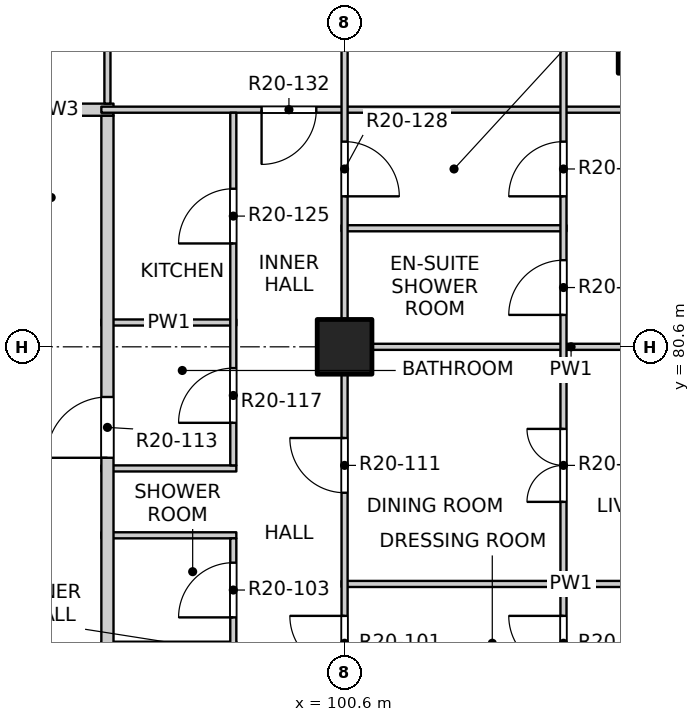
"""IFC4 building model, lengths in metres.
Left out: names, types, materials, properties, quantities, classifications, styles, units other than length and angle.
Written with IfcOpenShell. Run it as: python <this file> out.ifc"""

import sys

from ifc_helpers import new_model, si_unit, direction, frame, frame_2d, origin, origin_2d, place, context, subcontext, project, spatial, rectangle, extrude, element, fill, save


model = new_model("IFC4")
c1 = context("Model", 3, precision=1e-05, world=origin(), true_north=direction((0.0, 1.0)))
c2 = subcontext(c1, "Body", "Model", "MODEL_VIEW")
j1 = project(units=[si_unit("LENGTHUNIT", "METRE"), si_unit("PLANEANGLEUNIT", "RADIAN")], contexts=[c1])
p1 = place(None, origin())
s1 = spatial("IfcSite", under=j1, at=p1, CompositionType="ELEMENT")
p2 = place(p1, origin())
s2 = spatial("IfcBuilding", under=s1, at=p2, CompositionType="ELEMENT")
p3 = place(p2, frame((0.0, 0.0, 210.9)))
s3 = spatial("IfcBuildingStorey", under=s2, at=p3, CompositionType="ELEMENT", Elevation=210.9)
p4 = place(p3, frame((105.5, 85.5, -0.25), z_axis=(0.0, 0.0, 1.0), x_axis=(1.0, 0.0, 0.0)))
e1 = element("IfcColumn", 1, at=p4, inside=s3, PredefinedType="COLUMN", context=c2, shape_type="SweptSolid", body=[
    extrude(rectangle(XDim=0.8, YDim=0.8, at=origin_2d()), origin(), (0.0, 0.0, 1.0), 3.4),
])
p5 = place(p3, frame((100.6, 80.6, -0.25), z_axis=(0.0, 0.0, 1.0), x_axis=(1.0, 0.0, 0.0)))
e2 = element("IfcColumn", 2, at=p5, inside=s3, PredefinedType="COLUMN", context=c2, shape_type="SweptSolid", body=[
    extrude(rectangle(XDim=0.9, YDim=0.9, at=origin_2d()), origin(), (0.0, 0.0, 1.0), 3.4),
])
p6 = place(p3, frame((100.55, 76.7, 0.0), z_axis=(0.0, 0.0, 1.0), x_axis=(1.0, 0.0, 0.0)))
e3 = element("IfcWall", 3, at=p6, inside=s3, PredefinedType="PARTITIONING", context=c2, shape_type="SweptSolid", body=[
    extrude(rectangle(XDim=7.55, YDim=0.1, at=frame_2d((3.775, 0.0))), origin(), (0.0, 0.0, 1.0), 2.55),
])
for number, where, z_axis, x_axis in (
    (4, (96.6, 77.5, 0.0), (0.0, 0.0, 1.0), (1.0, 0.0, 0.0)),
    (5, (96.6, 78.6, 0.0), (0.0, 0.0, 1.0), (1.0, 0.0, 0.0)),
):
    element("IfcWall", number, at=place(p3, frame(where, z_axis=z_axis, x_axis=x_axis)), inside=s3, PredefinedType="PARTITIONING", context=c2, shape_type="SweptSolid", body=[
        extrude(rectangle(XDim=2.22, YDim=0.1, at=frame_2d((1.11, 0.0))), origin(), (0.0, 0.0, 1.0), 3.15),
    ])
p7 = place(p3, frame((100.55, 80.6, 0.0), z_axis=(0.0, 0.0, 1.0), x_axis=(1.0, 0.0, 0.0)))
e6 = element("IfcWall", 6, at=p7, inside=s3, PredefinedType="PARTITIONING", context=c2, shape_type="SweptSolid", body=[
    extrude(rectangle(XDim=7.55, YDim=0.1, at=frame_2d((3.775, 0.0))), origin(), (0.0, 0.0, 1.0), 3.15),
])
p8 = place(p3, frame((96.6, 81.0, 0.0), z_axis=(0.0, 0.0, 1.0), x_axis=(1.0, 0.0, 0.0)))
e7 = element("IfcWall", 7, at=p8, inside=s3, PredefinedType="PARTITIONING", context=c2, shape_type="SweptSolid", body=[
    extrude(rectangle(XDim=2.22, YDim=0.1, at=frame_2d((1.11, 0.0))), origin(), (0.0, 0.0, 1.0), 3.15),
])
p9 = place(p3, frame((100.55, 82.55, 0.0), z_axis=(0.0, 0.0, 1.0), x_axis=(1.0, 0.0, 0.0)))
e8 = element("IfcWall", 8, at=p9, inside=s3, PredefinedType="PARTITIONING", context=c2, shape_type="SweptSolid", body=[
    extrude(rectangle(XDim=3.7, YDim=0.1, at=frame_2d((1.85, 0.0))), origin(), (0.0, 0.0, 1.0), 3.15),
])
p10 = place(p3, frame((94.95, 84.5, 0.0), z_axis=(0.0, 0.0, 1.0), x_axis=(1.0, 0.0, 0.0)))
e9 = element("IfcWall", 9, at=p10, inside=s3, PredefinedType="PARTITIONING", context=c2, shape_type="SweptSolid", body=[
    extrude(rectangle(XDim=1.85, YDim=0.2, at=frame_2d((0.925, 0.0))), origin(), (0.0, 0.0, 1.0), 3.15),
])
p11 = place(p3, frame((96.6, 84.5, 0.0), z_axis=(0.0, 0.0, 1.0), x_axis=(1.0, 0.0, 0.0)))
e10 = element("IfcWall", 10, at=p11, inside=s3, PredefinedType="PARTITIONING", context=c2, shape_type="SweptSolid", body=[
    extrude(rectangle(XDim=11.5, YDim=0.1, at=frame_2d((5.75, 0.0))), origin(), (0.0, 0.0, 1.0), 3.15),
])
p12 = place(p11, frame((2.635, 0.0, 0.0)))
e11 = element("IfcOpeningElement", 11, at=p12, cuts=e10, PredefinedType="OPENING", context=c2, shape_type="SweptSolid", body=[
    extrude(rectangle(XDim=0.9, YDim=2.1, at=frame_2d((0.45, 1.05))), frame((0.0, 0.06, 0.0), z_axis=(0.0, -1.0, 0.0), x_axis=(1.0, 0.0, 0.0)), (0.0, 0.0, 1.0), 0.12),
])
p13 = place(p3, frame((96.7, 49.5, 0.0), z_axis=(0.0, 0.0, 1.0), x_axis=(0.0, 1.0, 0.0)))
e12 = element("IfcWall", 12, at=p13, inside=s3, PredefinedType="PARTITIONING", context=c2, shape_type="SweptSolid", body=[
    extrude(rectangle(XDim=34.9, YDim=0.2, at=frame_2d((17.45, 0.0))), origin(), (0.0, 0.0, 1.0), 3.15),
])
p14 = place(p13, frame((9.625, 0.0, 0.0)))
e13 = element("IfcOpeningElement", 13, at=p14, cuts=e12, PredefinedType="OPENING", context=c2, shape_type="SweptSolid", body=[
    extrude(rectangle(XDim=1.0, YDim=2.1, at=frame_2d((0.5, 1.05))), frame((0.0, 0.11, 0.0), z_axis=(0.0, -1.0, 0.0), x_axis=(1.0, 0.0, 0.0)), (0.0, 0.0, 1.0), 0.22),
])
p15 = place(p13, frame((14.125, 0.0, 0.0)))
e14 = element("IfcOpeningElement", 14, at=p15, cuts=e12, PredefinedType="OPENING", context=c2, shape_type="SweptSolid", body=[
    extrude(rectangle(XDim=1.0, YDim=2.1, at=frame_2d((0.5, 1.05))), frame((0.0, 0.11, 0.0), z_axis=(0.0, -1.0, 0.0), x_axis=(1.0, 0.0, 0.0)), (0.0, 0.0, 1.0), 0.22),
])
p16 = place(p13, frame((29.275, 0.0, 0.0)))
e15 = element("IfcOpeningElement", 15, at=p16, cuts=e12, PredefinedType="OPENING", context=c2, shape_type="SweptSolid", body=[
    extrude(rectangle(XDim=1.0, YDim=2.1, at=frame_2d((0.5, 1.05))), frame((0.0, 0.11, 0.0), z_axis=(0.0, -1.0, 0.0), x_axis=(1.0, 0.0, 0.0)), (0.0, 0.0, 1.0), 0.22),
])
p17 = place(p3, frame((96.7, 84.6, 0.0), z_axis=(0.0, 0.0, 1.0), x_axis=(0.0, 1.0, 0.0)))
e16 = element("IfcWall", 16, at=p17, inside=s3, PredefinedType="PARTITIONING", context=c2, shape_type="SweptSolid", body=[
    extrude(rectangle(XDim=3.5, YDim=0.1, at=frame_2d((1.75, 0.0))), origin(), (0.0, 0.0, 1.0), 3.15),
])
p18 = place(p17, frame((1.4, 0.0, 0.0)))
e17 = element("IfcOpeningElement", 17, at=p18, cuts=e16, PredefinedType="OPENING", context=c2, shape_type="SweptSolid", body=[
    extrude(rectangle(XDim=0.9, YDim=2.1, at=frame_2d((0.45, 1.05))), frame((0.0, 0.06, 0.0), z_axis=(0.0, -1.0, 0.0), x_axis=(1.0, 0.0, 0.0)), (0.0, 0.0, 1.0), 0.12),
])
p19 = place(p3, frame((98.77, 63.5, 0.0), z_axis=(0.0, 0.0, 1.0), x_axis=(0.0, 1.0, 0.0)))
e18 = element("IfcWall", 18, at=p19, inside=s3, PredefinedType="PARTITIONING", context=c2, shape_type="SweptSolid", body=[
    extrude(rectangle(XDim=13.95, YDim=0.1, at=frame_2d((6.975, 0.0))), origin(), (0.0, 0.0, 1.0), 3.15),
])
p20 = place(p19, frame((1.26, 0.0, 0.0)))
e19 = element("IfcOpeningElement", 19, at=p20, cuts=e18, PredefinedType="OPENING", context=c2, shape_type="SweptSolid", body=[
    extrude(rectangle(XDim=0.9, YDim=2.1, at=frame_2d((0.45, 1.05))), frame((0.0, 0.06, 0.0), z_axis=(0.0, -1.0, 0.0), x_axis=(1.0, 0.0, 0.0)), (0.0, 0.0, 1.0), 0.12),
])
p21 = place(p19, frame((4.535, 0.0, 0.0)))
e20 = element("IfcOpeningElement", 20, at=p21, cuts=e18, PredefinedType="OPENING", context=c2, shape_type="SweptSolid", body=[
    extrude(rectangle(XDim=0.8, YDim=2.1, at=frame_2d((0.4, 1.05))), frame((0.0, 0.06, 0.0), z_axis=(0.0, -1.0, 0.0), x_axis=(1.0, 0.0, 0.0)), (0.0, 0.0, 1.0), 0.12),
])
p22 = place(p19, frame((7.45, 0.0, 0.0)))
e21 = element("IfcOpeningElement", 21, at=p22, cuts=e18, PredefinedType="OPENING", context=c2, shape_type="SweptSolid", body=[
    extrude(rectangle(XDim=0.8, YDim=2.1, at=frame_2d((0.4, 1.05))), frame((0.0, 0.06, 0.0), z_axis=(0.0, -1.0, 0.0), x_axis=(1.0, 0.0, 0.0)), (0.0, 0.0, 1.0), 0.12),
])
p23 = place(p19, frame((10.35, 0.0, 0.0)))
e22 = element("IfcOpeningElement", 22, at=p23, cuts=e18, PredefinedType="OPENING", context=c2, shape_type="SweptSolid", body=[
    extrude(rectangle(XDim=0.8, YDim=2.1, at=frame_2d((0.4, 1.05))), frame((0.0, 0.06, 0.0), z_axis=(0.0, -1.0, 0.0), x_axis=(1.0, 0.0, 0.0)), (0.0, 0.0, 1.0), 0.12),
])
p24 = place(p19, frame((12.65, 0.0, 0.0)))
e23 = element("IfcOpeningElement", 23, at=p24, cuts=e18, PredefinedType="OPENING", context=c2, shape_type="SweptSolid", body=[
    extrude(rectangle(XDim=0.9, YDim=2.1, at=frame_2d((0.45, 1.05))), frame((0.0, 0.06, 0.0), z_axis=(0.0, -1.0, 0.0), x_axis=(1.0, 0.0, 0.0)), (0.0, 0.0, 1.0), 0.12),
])
p25 = place(p3, frame((98.77, 78.65, 0.0), z_axis=(0.0, 0.0, 1.0), x_axis=(0.0, 1.0, 0.0)))
e24 = element("IfcWall", 24, at=p25, inside=s3, PredefinedType="PARTITIONING", context=c2, shape_type="SweptSolid", body=[
    extrude(rectangle(XDim=5.8, YDim=0.1, at=frame_2d((2.9, 0.0))), origin(), (0.0, 0.0, 1.0), 3.15),
])
p26 = place(p25, frame((0.7, 0.0, 0.0)))
e25 = element("IfcOpeningElement", 25, at=p26, cuts=e24, PredefinedType="OPENING", context=c2, shape_type="SweptSolid", body=[
    extrude(rectangle(XDim=0.9, YDim=2.1, at=frame_2d((0.45, 1.05))), frame((0.0, 0.06, 0.0), z_axis=(0.0, -1.0, 0.0), x_axis=(1.0, 0.0, 0.0)), (0.0, 0.0, 1.0), 0.12),
])
p27 = place(p25, frame((3.65, 0.0, 0.0)))
e26 = element("IfcOpeningElement", 26, at=p27, cuts=e24, PredefinedType="OPENING", context=c2, shape_type="SweptSolid", body=[
    extrude(rectangle(XDim=0.9, YDim=2.1, at=frame_2d((0.45, 1.05))), frame((0.0, 0.06, 0.0), z_axis=(0.0, -1.0, 0.0), x_axis=(1.0, 0.0, 0.0)), (0.0, 0.0, 1.0), 0.12),
])
p28 = place(p3, frame((100.6, 41.9, 0.0), z_axis=(0.0, 0.0, 1.0), x_axis=(0.0, 1.0, 0.0)))
e27 = element("IfcWall", 27, at=p28, inside=s3, PredefinedType="PARTITIONING", context=c2, shape_type="SweptSolid", body=[
    extrude(rectangle(XDim=46.2, YDim=0.1, at=frame_2d((23.1, 0.0))), origin(), (0.0, 0.0, 1.0), 3.15),
])
p29 = place(p28, frame((1.2, 0.0, 0.0)))
e28 = element("IfcOpeningElement", 28, at=p29, cuts=e27, PredefinedType="OPENING", context=c2, shape_type="SweptSolid", body=[
    extrude(rectangle(XDim=0.9, YDim=2.1, at=frame_2d((0.45, 1.05))), frame((0.0, 0.06, 0.0), z_axis=(0.0, -1.0, 0.0), x_axis=(1.0, 0.0, 0.0)), (0.0, 0.0, 1.0), 0.12),
])
p30 = place(p28, frame((6.025, 0.0, 0.0)))
e29 = element("IfcOpeningElement", 29, at=p30, cuts=e27, PredefinedType="OPENING", context=c2, shape_type="SweptSolid", body=[
    extrude(rectangle(XDim=0.9, YDim=2.1, at=frame_2d((0.45, 1.05))), frame((0.0, 0.06, 0.0), z_axis=(0.0, -1.0, 0.0), x_axis=(1.0, 0.0, 0.0)), (0.0, 0.0, 1.0), 0.12),
])
p31 = place(p28, frame((9.0, 0.0, 0.0)))
e30 = element("IfcOpeningElement", 30, at=p31, cuts=e27, PredefinedType="OPENING", context=c2, shape_type="SweptSolid", body=[
    extrude(rectangle(XDim=0.9, YDim=2.1, at=frame_2d((0.45, 1.05))), frame((0.0, 0.06, 0.0), z_axis=(0.0, -1.0, 0.0), x_axis=(1.0, 0.0, 0.0)), (0.0, 0.0, 1.0), 0.12),
])
p32 = place(p28, frame((13.85, 0.0, 0.0)))
e31 = element("IfcOpeningElement", 31, at=p32, cuts=e27, PredefinedType="OPENING", context=c2, shape_type="SweptSolid", body=[
    extrude(rectangle(XDim=0.9, YDim=2.1, at=frame_2d((0.45, 1.05))), frame((0.0, 0.06, 0.0), z_axis=(0.0, -1.0, 0.0), x_axis=(1.0, 0.0, 0.0)), (0.0, 0.0, 1.0), 0.12),
])
p33 = place(p28, frame((17.775, 0.0, 0.0)))
e32 = element("IfcOpeningElement", 32, at=p33, cuts=e27, PredefinedType="OPENING", context=c2, shape_type="SweptSolid", body=[
    extrude(rectangle(XDim=0.9, YDim=2.1, at=frame_2d((0.45, 1.05))), frame((0.0, 0.06, 0.0), z_axis=(0.0, -1.0, 0.0), x_axis=(1.0, 0.0, 0.0)), (0.0, 0.0, 1.0), 0.12),
])
p34 = place(p28, frame((20.7, 0.0, 0.0)))
e33 = element("IfcOpeningElement", 33, at=p34, cuts=e27, PredefinedType="OPENING", context=c2, shape_type="SweptSolid", body=[
    extrude(rectangle(XDim=0.9, YDim=2.1, at=frame_2d((0.45, 1.05))), frame((0.0, 0.06, 0.0), z_axis=(0.0, -1.0, 0.0), x_axis=(1.0, 0.0, 0.0)), (0.0, 0.0, 1.0), 0.12),
])
p35 = place(p28, frame((24.6, 0.0, 0.0)))
e34 = element("IfcOpeningElement", 34, at=p35, cuts=e27, PredefinedType="OPENING", context=c2, shape_type="SweptSolid", body=[
    extrude(rectangle(XDim=0.9, YDim=2.1, at=frame_2d((0.45, 1.05))), frame((0.0, 0.06, 0.0), z_axis=(0.0, -1.0, 0.0), x_axis=(1.0, 0.0, 0.0)), (0.0, 0.0, 1.0), 0.12),
])
p36 = place(p28, frame((29.425, 0.0, 0.0)))
e35 = element("IfcOpeningElement", 35, at=p36, cuts=e27, PredefinedType="OPENING", context=c2, shape_type="SweptSolid", body=[
    extrude(rectangle(XDim=0.9, YDim=2.1, at=frame_2d((0.45, 1.05))), frame((0.0, 0.06, 0.0), z_axis=(0.0, -1.0, 0.0), x_axis=(1.0, 0.0, 0.0)), (0.0, 0.0, 1.0), 0.12),
])
p37 = place(p28, frame((33.375, 0.0, 0.0)))
e36 = element("IfcOpeningElement", 36, at=p37, cuts=e27, PredefinedType="OPENING", context=c2, shape_type="SweptSolid", body=[
    extrude(rectangle(XDim=0.9, YDim=2.1, at=frame_2d((0.45, 1.05))), frame((0.0, 0.06, 0.0), z_axis=(0.0, -1.0, 0.0), x_axis=(1.0, 0.0, 0.0)), (0.0, 0.0, 1.0), 0.12),
])
p38 = place(p28, frame((36.3, 0.0, 0.0)))
e37 = element("IfcOpeningElement", 37, at=p38, cuts=e27, PredefinedType="OPENING", context=c2, shape_type="SweptSolid", body=[
    extrude(rectangle(XDim=0.9, YDim=2.1, at=frame_2d((0.45, 1.05))), frame((0.0, 0.06, 0.0), z_axis=(0.0, -1.0, 0.0), x_axis=(1.0, 0.0, 0.0)), (0.0, 0.0, 1.0), 0.12),
])
p39 = place(p28, frame((41.175, 0.0, 0.0)))
e38 = element("IfcOpeningElement", 38, at=p39, cuts=e27, PredefinedType="OPENING", context=c2, shape_type="SweptSolid", body=[
    extrude(rectangle(XDim=0.9, YDim=2.1, at=frame_2d((0.45, 1.05))), frame((0.0, 0.06, 0.0), z_axis=(0.0, -1.0, 0.0), x_axis=(1.0, 0.0, 0.0)), (0.0, 0.0, 1.0), 0.12),
])
p40 = place(p28, frame((44.1, 0.0, 0.0)))
e39 = element("IfcOpeningElement", 39, at=p40, cuts=e27, PredefinedType="OPENING", context=c2, shape_type="SweptSolid", body=[
    extrude(rectangle(XDim=0.9, YDim=2.1, at=frame_2d((0.45, 1.05))), frame((0.0, 0.06, 0.0), z_axis=(0.0, -1.0, 0.0), x_axis=(1.0, 0.0, 0.0)), (0.0, 0.0, 1.0), 0.12),
])
p41 = place(p3, frame((104.2, 61.2, 0.0), z_axis=(0.0, 0.0, 1.0), x_axis=(0.0, 1.0, 0.0)))
e40 = element("IfcWall", 40, at=p41, inside=s3, PredefinedType="PARTITIONING", context=c2, shape_type="SweptSolid", body=[
    extrude(rectangle(XDim=26.9, YDim=0.1, at=frame_2d((13.45, 0.0))), origin(), (0.0, 0.0, 1.0), 3.15),
])
p42 = place(p41, frame((1.25, 0.0, 0.0)))
e41 = element("IfcOpeningElement", 41, at=p42, cuts=e40, PredefinedType="OPENING", context=c2, shape_type="SweptSolid", body=[
    extrude(rectangle(XDim=1.2, YDim=2.1, at=frame_2d((0.6, 1.05))), frame((0.0, 0.06, 0.0), z_axis=(0.0, -1.0, 0.0), x_axis=(1.0, 0.0, 0.0)), (0.0, 0.0, 1.0), 0.12),
])
p43 = place(p41, frame((5.15, 0.0, 0.0)))
e42 = element("IfcOpeningElement", 42, at=p43, cuts=e40, PredefinedType="OPENING", context=c2, shape_type="SweptSolid", body=[
    extrude(rectangle(XDim=1.2, YDim=2.1, at=frame_2d((0.6, 1.05))), frame((0.0, 0.06, 0.0), z_axis=(0.0, -1.0, 0.0), x_axis=(1.0, 0.0, 0.0)), (0.0, 0.0, 1.0), 0.12),
])
p44 = place(p41, frame((8.225, 0.0, 0.0)))
e43 = element("IfcOpeningElement", 43, at=p44, cuts=e40, PredefinedType="OPENING", context=c2, shape_type="SweptSolid", body=[
    extrude(rectangle(XDim=0.9, YDim=2.1, at=frame_2d((0.45, 1.05))), frame((0.0, 0.06, 0.0), z_axis=(0.0, -1.0, 0.0), x_axis=(1.0, 0.0, 0.0)), (0.0, 0.0, 1.0), 0.12),
])
p45 = place(p41, frame((10.175, 0.0, 0.0)))
e44 = element("IfcOpeningElement", 44, at=p45, cuts=e40, PredefinedType="OPENING", context=c2, shape_type="SweptSolid", body=[
    extrude(rectangle(XDim=0.9, YDim=2.1, at=frame_2d((0.45, 1.05))), frame((0.0, 0.06, 0.0), z_axis=(0.0, -1.0, 0.0), x_axis=(1.0, 0.0, 0.0)), (0.0, 0.0, 1.0), 0.12),
])
p46 = place(p41, frame((12.125, 0.0, 0.0)))
e45 = element("IfcOpeningElement", 45, at=p46, cuts=e40, PredefinedType="OPENING", context=c2, shape_type="SweptSolid", body=[
    extrude(rectangle(XDim=0.9, YDim=2.1, at=frame_2d((0.45, 1.05))), frame((0.0, 0.06, 0.0), z_axis=(0.0, -1.0, 0.0), x_axis=(1.0, 0.0, 0.0)), (0.0, 0.0, 1.0), 0.12),
])
p47 = place(p41, frame((14.075, 0.0, 0.0)))
e46 = element("IfcOpeningElement", 46, at=p47, cuts=e40, PredefinedType="OPENING", context=c2, shape_type="SweptSolid", body=[
    extrude(rectangle(XDim=0.9, YDim=2.1, at=frame_2d((0.45, 1.05))), frame((0.0, 0.06, 0.0), z_axis=(0.0, -1.0, 0.0), x_axis=(1.0, 0.0, 0.0)), (0.0, 0.0, 1.0), 0.12),
])
p48 = place(p41, frame((16.85, 0.0, 0.0)))
e47 = element("IfcOpeningElement", 47, at=p48, cuts=e40, PredefinedType="OPENING", context=c2, shape_type="SweptSolid", body=[
    extrude(rectangle(XDim=1.2, YDim=2.1, at=frame_2d((0.6, 1.05))), frame((0.0, 0.06, 0.0), z_axis=(0.0, -1.0, 0.0), x_axis=(1.0, 0.0, 0.0)), (0.0, 0.0, 1.0), 0.12),
])
p49 = place(p41, frame((19.925, 0.0, 0.0)))
e48 = element("IfcOpeningElement", 48, at=p49, cuts=e40, PredefinedType="OPENING", context=c2, shape_type="SweptSolid", body=[
    extrude(rectangle(XDim=0.9, YDim=2.1, at=frame_2d((0.45, 1.05))), frame((0.0, 0.06, 0.0), z_axis=(0.0, -1.0, 0.0), x_axis=(1.0, 0.0, 0.0)), (0.0, 0.0, 1.0), 0.12),
])
p50 = place(p41, frame((21.875, 0.0, 0.0)))
e49 = element("IfcOpeningElement", 49, at=p50, cuts=e40, PredefinedType="OPENING", context=c2, shape_type="SweptSolid", body=[
    extrude(rectangle(XDim=0.9, YDim=2.1, at=frame_2d((0.45, 1.05))), frame((0.0, 0.06, 0.0), z_axis=(0.0, -1.0, 0.0), x_axis=(1.0, 0.0, 0.0)), (0.0, 0.0, 1.0), 0.12),
])
p51 = place(p41, frame((24.65, 0.0, 0.0)))
e50 = element("IfcOpeningElement", 50, at=p51, cuts=e40, PredefinedType="OPENING", context=c2, shape_type="SweptSolid", body=[
    extrude(rectangle(XDim=1.2, YDim=2.1, at=frame_2d((0.6, 1.05))), frame((0.0, 0.06, 0.0), z_axis=(0.0, -1.0, 0.0), x_axis=(1.0, 0.0, 0.0)), (0.0, 0.0, 1.0), 0.12),
])
p52 = place(p37, origin())
e51 = element("IfcDoor", 51, at=p52, inside=s3, OperationType="SINGLE_SWING_RIGHT", PredefinedType="DOOR", context=c2, shape_type="SweptSolid", body=[
    extrude(rectangle(XDim=0.9, YDim=2.1, at=frame_2d((0.45, 1.05))), frame((0.0, 0.025, 0.0), z_axis=(0.0, -1.0, 0.0), x_axis=(1.0, 0.0, 0.0)), (0.0, 0.0, 1.0), 0.05),
])
fill(e36, e51)
p53 = place(p47, origin())
e52 = element("IfcDoor", 52, at=p53, inside=s3, OperationType="SINGLE_SWING_RIGHT", PredefinedType="DOOR", context=c2, shape_type="SweptSolid", body=[
    extrude(rectangle(XDim=0.9, YDim=2.1, at=frame_2d((0.45, 1.05))), frame((0.0, 0.025, 0.0), z_axis=(0.0, -1.0, 0.0), x_axis=(1.0, 0.0, 0.0)), (0.0, 0.0, 1.0), 0.05),
])
fill(e46, e52)
p54 = place(p24, origin())
e53 = element("IfcDoor", 53, at=p54, inside=s3, OperationType="SINGLE_SWING_LEFT", PredefinedType="DOOR", context=c2, shape_type="SweptSolid", body=[
    extrude(rectangle(XDim=0.9, YDim=2.1, at=frame_2d((0.45, 1.05))), frame((0.0, 0.025, 0.0), z_axis=(0.0, -1.0, 0.0), x_axis=(1.0, 0.0, 0.0)), (0.0, 0.0, 1.0), 0.05),
])
fill(e23, e53)
p55 = place(p38, origin())
e54 = element("IfcDoor", 54, at=p55, inside=s3, OperationType="SINGLE_SWING_RIGHT", PredefinedType="DOOR", context=c2, shape_type="SweptSolid", body=[
    extrude(rectangle(XDim=0.9, YDim=2.1, at=frame_2d((0.45, 1.05))), frame((0.0, 0.025, 0.0), z_axis=(0.0, -1.0, 0.0), x_axis=(1.0, 0.0, 0.0)), (0.0, 0.0, 1.0), 0.05),
])
fill(e37, e54)
p56 = place(p48, origin())
e55 = element("IfcDoor", 55, at=p56, inside=s3, OperationType="DOUBLE_DOOR_SINGLE_SWING", PredefinedType="DOOR", context=c2, shape_type="SweptSolid", body=[
    extrude(rectangle(XDim=1.2, YDim=2.1, at=frame_2d((0.6, 1.05))), frame((0.0, 0.025, 0.0), z_axis=(0.0, -1.0, 0.0), x_axis=(1.0, 0.0, 0.0)), (0.0, 0.0, 1.0), 0.05),
])
fill(e47, e55)
p57 = place(p16, origin())
e56 = element("IfcDoor", 56, at=p57, inside=s3, OperationType="SINGLE_SWING_LEFT", PredefinedType="DOOR", context=c2, shape_type="SweptSolid", body=[
    extrude(rectangle(XDim=1.0, YDim=2.1, at=frame_2d((0.5, 1.05))), frame((0.0, 0.025, 0.0), z_axis=(0.0, -1.0, 0.0), x_axis=(1.0, 0.0, 0.0)), (0.0, 0.0, 1.0), 0.05),
])
fill(e15, e56)
p58 = place(p26, origin())
e57 = element("IfcDoor", 57, at=p58, inside=s3, OperationType="SINGLE_SWING_LEFT", PredefinedType="DOOR", context=c2, shape_type="SweptSolid", body=[
    extrude(rectangle(XDim=0.9, YDim=2.1, at=frame_2d((0.45, 1.05))), frame((0.0, 0.025, 0.0), z_axis=(0.0, -1.0, 0.0), x_axis=(1.0, 0.0, 0.0)), (0.0, 0.0, 1.0), 0.05),
])
fill(e25, e57)
p59 = place(p49, origin())
e58 = element("IfcDoor", 58, at=p59, inside=s3, OperationType="SINGLE_SWING_LEFT", PredefinedType="DOOR", context=c2, shape_type="SweptSolid", body=[
    extrude(rectangle(XDim=0.9, YDim=2.1, at=frame_2d((0.45, 1.05))), frame((0.0, 0.025, 0.0), z_axis=(0.0, -1.0, 0.0), x_axis=(1.0, 0.0, 0.0)), (0.0, 0.0, 1.0), 0.05),
])
fill(e48, e58)
p60 = place(p27, origin())
e59 = element("IfcDoor", 59, at=p60, inside=s3, OperationType="SINGLE_SWING_LEFT", PredefinedType="DOOR", context=c2, shape_type="SweptSolid", body=[
    extrude(rectangle(XDim=0.9, YDim=2.1, at=frame_2d((0.45, 1.05))), frame((0.0, 0.025, 0.0), z_axis=(0.0, -1.0, 0.0), x_axis=(1.0, 0.0, 0.0)), (0.0, 0.0, 1.0), 0.05),
])
fill(e26, e59)
p61 = place(p39, origin())
e60 = element("IfcDoor", 60, at=p61, inside=s3, OperationType="SINGLE_SWING_RIGHT", PredefinedType="DOOR", context=c2, shape_type="SweptSolid", body=[
    extrude(rectangle(XDim=0.9, YDim=2.1, at=frame_2d((0.45, 1.05))), frame((0.0, 0.025, 0.0), z_axis=(0.0, -1.0, 0.0), x_axis=(1.0, 0.0, 0.0)), (0.0, 0.0, 1.0), 0.05),
])
fill(e38, e60)
p62 = place(p50, origin())
e61 = element("IfcDoor", 61, at=p62, inside=s3, OperationType="SINGLE_SWING_LEFT", PredefinedType="DOOR", context=c2, shape_type="SweptSolid", body=[
    extrude(rectangle(XDim=0.9, YDim=2.1, at=frame_2d((0.45, 1.05))), frame((0.0, 0.025, 0.0), z_axis=(0.0, -1.0, 0.0), x_axis=(1.0, 0.0, 0.0)), (0.0, 0.0, 1.0), 0.05),
])
fill(e49, e61)
p63 = place(p12, origin())
e62 = element("IfcDoor", 62, at=p63, inside=s3, OperationType="SINGLE_SWING_RIGHT", PredefinedType="DOOR", context=c2, shape_type="SweptSolid", body=[
    extrude(rectangle(XDim=0.9, YDim=2.1, at=frame_2d((0.45, 1.05))), frame((0.0, 0.025, 0.0), z_axis=(0.0, -1.0, 0.0), x_axis=(1.0, 0.0, 0.0)), (0.0, 0.0, 1.0), 0.05),
])
fill(e11, e62)
save(model, sys.argv[1])
